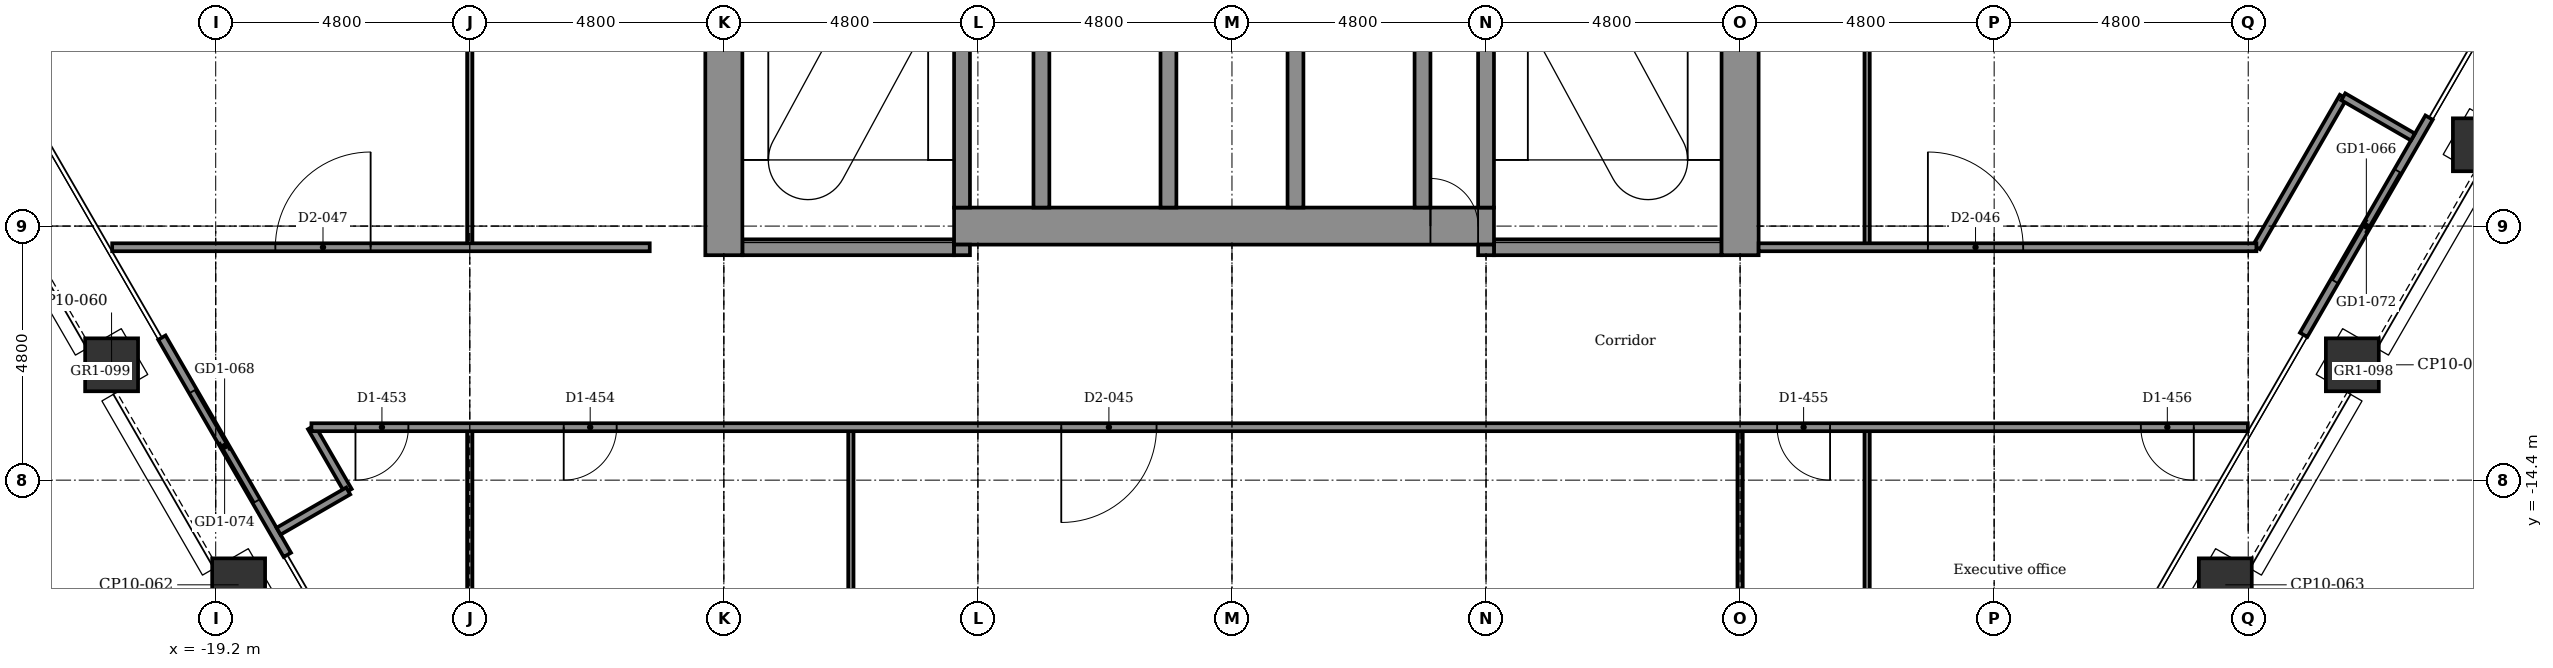
"""IFC4 building model, lengths in metres.
Left out: names, types, materials, properties, quantities, classifications, styles, units other than length and angle.
Written with IfcOpenShell. Run it as: python <this file> out.ifc"""

import sys

from ifc_helpers import new_model, si_unit, direction, frame, frame_2d, origin, origin_2d, place, context, subcontext, project, spatial, rectangle, extrude, element, fill, save


model = new_model("IFC4")
c1 = context("Model", 3, precision=1e-05, world=origin(), true_north=direction((0.0, 1.0)))
c2 = subcontext(c1, "Body", "Model", "MODEL_VIEW")
j1 = project(units=[si_unit("LENGTHUNIT", "METRE"), si_unit("PLANEANGLEUNIT", "RADIAN")], contexts=[c1])
p1 = place(None, origin())
s1 = spatial("IfcSite", under=j1, at=p1, CompositionType="ELEMENT")
p2 = place(p1, origin())
s2 = spatial("IfcBuilding", under=s1, at=p2, CompositionType="ELEMENT")
p3 = place(p2, frame((0.0, 0.0, 154.4)))
s3 = spatial("IfcBuildingStorey", under=s2, at=p3, CompositionType="ELEMENT", Elevation=154.4)
for number, where, z_axis, x_axis in (
    (1, (23.567, -8.064, -0.15), (0.0, 0.0, 1.0), (0.5, 0.866, 0.0)),
    (2, (21.167, -12.221, -0.15), (0.0, 0.0, 1.0), (0.5, 0.866, 0.0)),
    (3, (18.767, -16.378, -0.15), (0.0, 0.0, 1.0), (0.5, 0.866, 0.0)),
    (4, (-18.767, -16.378, -0.15), (0.0, 0.0, 1.0), (0.866, 0.5, 0.0)),
    (5, (-21.167, -12.221, -0.15), (0.0, 0.0, 1.0), (0.866, 0.5, 0.0)),
):
    element("IfcColumn", number, at=place(p3, frame(where, z_axis=z_axis, x_axis=x_axis)), inside=s3, PredefinedType="COLUMN", context=c2, shape_type="SweptSolid", body=[
        extrude(rectangle(XDim=1.0, YDim=1.0, at=origin_2d()), origin(), (0.0, 0.0, 1.0), 3.9),
    ])
p4 = place(p3, frame((-9.25, -10.0, -0.15), z_axis=(0.0, 0.0, 1.0), x_axis=(1.0, 0.0, 0.0)))
e6 = element("IfcWall", 6, at=p4, inside=s3, PredefinedType="STANDARD", context=c2, shape_type="SweptSolid", body=[
    extrude(rectangle(XDim=4.0, YDim=0.3, at=frame_2d((2.0, 0.0))), origin(), (0.0, 0.0, 1.0), 3.9),
])
p5 = place(p3, frame((4.95, -10.0, -0.15), z_axis=(0.0, 0.0, 1.0), x_axis=(1.0, 0.0, 0.0)))
e7 = element("IfcWall", 7, at=p5, inside=s3, PredefinedType="STANDARD", context=c2, shape_type="SweptSolid", body=[
    extrude(rectangle(XDim=4.3, YDim=0.3, at=frame_2d((2.15, 0.0))), origin(), (0.0, 0.0, 1.0), 3.9),
])
p6 = place(p3, frame((-5.25, -9.6, -0.15), z_axis=(0.0, 0.0, 1.0), x_axis=(1.0, 0.0, 0.0)))
e8 = element("IfcWall", 8, at=p6, inside=s3, PredefinedType="SHEAR", context=c2, shape_type="SweptSolid", body=[
    extrude(rectangle(XDim=10.2, YDim=0.7, at=frame_2d((5.1, 0.0))), origin(), (0.0, 0.0, 1.0), 3.9),
])
p7 = place(p6, frame((9.0, 0.0, 0.15)))
e9 = element("IfcOpeningElement", 9, at=p7, cuts=e8, PredefinedType="OPENING", context=c2, shape_type="SweptSolid", body=[
    extrude(rectangle(XDim=0.9, YDim=2.1, at=frame_2d((0.45, 1.05))), frame((0.0, 0.36, 0.0), z_axis=(0.0, -1.0, 0.0), x_axis=(1.0, 0.0, 0.0)), (0.0, 0.0, 1.0), 0.72),
])
p8 = place(p3, frame((-9.6, -10.15, -0.15), z_axis=(0.0, 0.0, 1.0), x_axis=(0.0, 1.0, 0.0)))
e10 = element("IfcWall", 10, at=p8, inside=s3, PredefinedType="SHEAR", context=c2, shape_type="SweptSolid", body=[
    extrude(rectangle(XDim=7.6, YDim=0.7, at=frame_2d((3.8, 0.0))), origin(), (0.0, 0.0, 1.0), 3.9),
])
p9 = place(p3, frame((-5.1, -10.15, -0.15), z_axis=(0.0, 0.0, 1.0), x_axis=(0.0, 1.0, 0.0)))
e11 = element("IfcWall", 11, at=p9, inside=s3, PredefinedType="STANDARD", context=c2, shape_type="SweptSolid", body=[
    extrude(rectangle(XDim=0.2, YDim=0.3, at=frame_2d((0.1, 0.0))), origin(), (0.0, 0.0, 1.0), 3.9),
])
p10 = place(p3, frame((-5.1, -9.25, -0.15), z_axis=(0.0, 0.0, 1.0), x_axis=(0.0, 1.0, 0.0)))
e12 = element("IfcWall", 12, at=p10, inside=s3, PredefinedType="STANDARD", context=c2, shape_type="SweptSolid", body=[
    extrude(rectangle(XDim=7.0, YDim=0.3, at=frame_2d((3.5, 0.0))), origin(), (0.0, 0.0, 1.0), 3.9),
])
p11 = place(p10, frame((3.8, 0.0, 0.15)))
e13 = element("IfcOpeningElement", 13, at=p11, cuts=e12, PredefinedType="OPENING", context=c2, shape_type="SweptSolid", body=[
    extrude(rectangle(XDim=1.2, YDim=2.1, at=frame_2d((0.6, 1.05))), frame((0.0, 0.16, 0.0), z_axis=(0.0, -1.0, 0.0), x_axis=(1.0, 0.0, 0.0)), (0.0, 0.0, 1.0), 0.32),
])
for number, where, z_axis, x_axis in (
    (14, (-3.6, -9.25, -0.15), (0.0, 0.0, 1.0), (0.0, 1.0, 0.0)),
    (15, (-1.2, -9.25, -0.15), (0.0, 0.0, 1.0), (0.0, 1.0, 0.0)),
    (16, (1.2, -9.25, -0.15), (0.0, 0.0, 1.0), (0.0, 1.0, 0.0)),
    (17, (3.6, -9.25, -0.15), (0.0, 0.0, 1.0), (0.0, 1.0, 0.0)),
):
    element("IfcWall", number, at=place(p3, frame(where, z_axis=z_axis, x_axis=x_axis)), inside=s3, PredefinedType="STANDARD", context=c2, shape_type="SweptSolid", body=[
        extrude(rectangle(XDim=3.4, YDim=0.3, at=frame_2d((1.7, 0.0))), origin(), (0.0, 0.0, 1.0), 3.9),
    ])
p12 = place(p3, frame((4.8, -10.15, -0.15), z_axis=(0.0, 0.0, 1.0), x_axis=(0.0, 1.0, 0.0)))
e18 = element("IfcWall", 18, at=p12, inside=s3, PredefinedType="STANDARD", context=c2, shape_type="SweptSolid", body=[
    extrude(rectangle(XDim=0.2, YDim=0.3, at=frame_2d((0.1, 0.0))), origin(), (0.0, 0.0, 1.0), 3.9),
])
p13 = place(p3, frame((4.8, -9.25, -0.15), z_axis=(0.0, 0.0, 1.0), x_axis=(0.0, 1.0, 0.0)))
e19 = element("IfcWall", 19, at=p13, inside=s3, PredefinedType="STANDARD", context=c2, shape_type="SweptSolid", body=[
    extrude(rectangle(XDim=7.0, YDim=0.3, at=frame_2d((3.5, 0.0))), origin(), (0.0, 0.0, 1.0), 3.9),
])
p14 = place(p13, frame((3.8, 0.0, 0.15)))
e20 = element("IfcOpeningElement", 20, at=p14, cuts=e19, PredefinedType="OPENING", context=c2, shape_type="SweptSolid", body=[
    extrude(rectangle(XDim=1.2, YDim=2.1, at=frame_2d((0.6, 1.05))), frame((0.0, 0.16, 0.0), z_axis=(0.0, -1.0, 0.0), x_axis=(1.0, 0.0, 0.0)), (0.0, 0.0, 1.0), 0.32),
])
p15 = place(p3, frame((9.6, -10.15, -0.15), z_axis=(0.0, 0.0, 1.0), x_axis=(0.0, 1.0, 0.0)))
e21 = element("IfcWall", 21, at=p15, inside=s3, PredefinedType="SHEAR", context=c2, shape_type="SweptSolid", body=[
    extrude(rectangle(XDim=20.1, YDim=0.7, at=frame_2d((10.05, 0.0))), origin(), (0.0, 0.0, 1.0), 3.9),
])
p16 = place(p3, frame((22.617, -7.55, 0.0), z_axis=(0.0, 0.0, 1.0), x_axis=(-0.5000167099, -0.866015756104, 0.0)))
e22 = element("IfcWall", 22, at=p16, inside=s3, PredefinedType="PARTITIONING", context=c2, shape_type="SweptSolid", body=[
    extrude(rectangle(XDim=4.74, YDim=0.16, at=frame_2d((2.37, 0.0))), origin(), (0.0, 0.0, 1.0), 3.75),
])
p17 = place(p16, frame((1.17, 0.0, 0.0)))
e23 = element("IfcOpeningElement", 23, at=p17, cuts=e22, PredefinedType="OPENING", context=c2, shape_type="SweptSolid", body=[
    extrude(rectangle(XDim=2.4, YDim=2.4, at=frame_2d((1.2, 1.2))), frame((0.0, 0.09, 0.0), z_axis=(0.0, -1.0, 0.0), x_axis=(1.0, 0.0, 0.0)), (0.0, 0.0, 1.0), 0.18),
])
p18 = place(p3, frame((-17.847, -15.812, 0.0), z_axis=(0.0, 0.0, 1.0), x_axis=(-0.5000167099, 0.866015756104, 0.0)))
e24 = element("IfcWall", 24, at=p18, inside=s3, PredefinedType="PARTITIONING", context=c2, shape_type="SweptSolid", body=[
    extrude(rectangle(XDim=4.74, YDim=0.16, at=frame_2d((2.37, 0.0))), origin(), (0.0, 0.0, 1.0), 3.75),
])
p19 = place(p18, frame((1.17, 0.0, 0.0)))
e25 = element("IfcOpeningElement", 25, at=p19, cuts=e24, PredefinedType="OPENING", context=c2, shape_type="SweptSolid", body=[
    extrude(rectangle(XDim=2.4, YDim=2.4, at=frame_2d((1.2, 1.2))), frame((0.0, 0.09, 0.0), z_axis=(0.0, -1.0, 0.0), x_axis=(1.0, 0.0, 0.0)), (0.0, 0.0, 1.0), 0.18),
])
p20 = place(p3, frame((12.0, -23.271, 0.0), z_axis=(0.0, 0.0, 1.0), x_axis=(0.0, 1.0, 0.0)))
e26 = element("IfcWall", 26, at=p20, inside=s3, PredefinedType="PARTITIONING", context=c2, shape_type="SweptSolid", body=[
    extrude(rectangle(XDim=9.872, YDim=0.1, at=frame_2d((4.936, 0.0))), origin(), (0.0, 0.0, 1.0), 3.75),
])
p21 = place(p3, frame((12.0, -10.0, 0.0), z_axis=(0.0, 0.0, 1.0), x_axis=(0.0, 1.0, 0.0)))
e27 = element("IfcWall", 27, at=p21, inside=s3, PredefinedType="PARTITIONING", context=c2, shape_type="SweptSolid", body=[
    extrude(rectangle(XDim=24.042, YDim=0.1, at=frame_2d((12.021, 0.0))), origin(), (0.0, 0.0, 1.0), 3.75),
])
p22 = place(p3, frame((9.6, -23.271, 0.0), z_axis=(0.0, 0.0, 1.0), x_axis=(0.0, 1.0, 0.0)))
e28 = element("IfcWall", 28, at=p22, inside=s3, PredefinedType="PARTITIONING", context=c2, shape_type="SweptSolid", body=[
    extrude(rectangle(XDim=9.872, YDim=0.1, at=frame_2d((4.936, 0.0))), origin(), (0.0, 0.0, 1.0), 3.066),
])
p23 = place(p3, frame((-7.2, -23.271, 0.0), z_axis=(0.0, 0.0, 1.0), x_axis=(0.0, 1.0, 0.0)))
e29 = element("IfcWall", 29, at=p23, inside=s3, PredefinedType="PARTITIONING", context=c2, shape_type="SweptSolid", body=[
    extrude(rectangle(XDim=9.872, YDim=0.1, at=frame_2d((4.936, 0.0))), origin(), (0.0, 0.0, 1.0), 3.75),
])
p24 = place(p3, frame((-14.4, -21.701, 0.0), z_axis=(0.0, 0.0, 1.0), x_axis=(0.0, 1.0, 0.0)))
e30 = element("IfcWall", 30, at=p24, inside=s3, PredefinedType="PARTITIONING", context=c2, shape_type="SweptSolid", body=[
    extrude(rectangle(XDim=8.302, YDim=0.1, at=frame_2d((4.151, 0.0))), origin(), (0.0, 0.0, 1.0), 3.066),
])
p25 = place(p3, frame((-14.4, -10.0, 0.0), z_axis=(0.0, 0.0, 1.0), x_axis=(0.0, 1.0, 0.0)))
e31 = element("IfcWall", 31, at=p25, inside=s3, PredefinedType="PARTITIONING", context=c2, shape_type="SweptSolid", body=[
    extrude(rectangle(XDim=19.694, YDim=0.1, at=frame_2d((9.847, 0.0))), origin(), (0.0, 0.0, 1.0), 3.75),
])
p26 = place(p3, frame((-17.392, -13.4, 0.0), z_axis=(0.0, 0.0, 1.0), x_axis=(0.4999705729, -0.866042392862, 0.0)))
e32 = element("IfcWall", 32, at=p26, inside=s3, PredefinedType="PARTITIONING", context=c2, shape_type="SweptSolid", body=[
    extrude(rectangle(XDim=1.391, YDim=0.15, at=frame_2d((0.696, 0.0))), origin(), (0.0, 0.0, 1.0), 3.75),
])
p27 = place(p3, frame((19.354, -10.0, 0.0), z_axis=(0.0, 0.0, 1.0), x_axis=(0.500009969958, 0.86601964755, 0.0)))
e33 = element("IfcWall", 33, at=p27, inside=s3, PredefinedType="PARTITIONING", context=c2, shape_type="SweptSolid", body=[
    extrude(rectangle(XDim=3.283, YDim=0.15, at=frame_2d((1.642, 0.0))), origin(), (0.0, 0.0, 1.0), 3.75),
])
p28 = place(p3, frame((20.996, -7.157, 0.0), z_axis=(0.0, 0.0, 1.0), x_axis=(0.865960906633, -0.500111695708, 0.0)))
e34 = element("IfcWall", 34, at=p28, inside=s3, PredefinedType="PARTITIONING", context=c2, shape_type="SweptSolid", body=[
    extrude(rectangle(XDim=1.52, YDim=0.15, at=frame_2d((0.76, 0.0))), origin(), (0.0, 0.0, 1.0), 3.75),
])
p29 = place(p3, frame((-18.012, -15.365, 0.0), z_axis=(0.0, 0.0, 1.0), x_axis=(0.866030456496, 0.499991248344, 0.0)))
e35 = element("IfcWall", 35, at=p29, inside=s3, PredefinedType="PARTITIONING", context=c2, shape_type="SweptSolid", body=[
    extrude(rectangle(XDim=1.52, YDim=0.15, at=frame_2d((0.76, 0.0))), origin(), (0.0, 0.0, 1.0), 3.75),
])
p30 = place(p3, frame((-17.392, -13.4, 0.0), z_axis=(0.0, 0.0, 1.0), x_axis=(1.0, 0.0, 0.0)))
e36 = element("IfcWall", 36, at=p30, inside=s3, PredefinedType="PARTITIONING", context=c2, shape_type="SweptSolid", body=[
    extrude(rectangle(XDim=36.584, YDim=0.15, at=frame_2d((18.292, 0.0))), origin(), (0.0, 0.0, 1.0), 3.75),
])
p31 = place(p30, frame((0.832, 0.0, 0.0)))
e37 = element("IfcOpeningElement", 37, at=p31, cuts=e36, PredefinedType="OPENING", context=c2, shape_type="SweptSolid", body=[
    extrude(rectangle(XDim=1.0, YDim=2.1, at=frame_2d((0.5, 1.05))), frame((0.0, 0.085, 0.0), z_axis=(0.0, -1.0, 0.0), x_axis=(1.0, 0.0, 0.0)), (0.0, 0.0, 1.0), 0.17),
])
p32 = place(p30, frame((4.767, 0.0, 0.0)))
e38 = element("IfcOpeningElement", 38, at=p32, cuts=e36, PredefinedType="OPENING", context=c2, shape_type="SweptSolid", body=[
    extrude(rectangle(XDim=1.0, YDim=2.1, at=frame_2d((0.5, 1.05))), frame((0.0, 0.085, 0.0), z_axis=(0.0, -1.0, 0.0), x_axis=(1.0, 0.0, 0.0)), (0.0, 0.0, 1.0), 0.17),
])
p33 = place(p30, frame((14.167, 0.0, 0.0)))
e39 = element("IfcOpeningElement", 39, at=p33, cuts=e36, PredefinedType="OPENING", context=c2, shape_type="SweptSolid", body=[
    extrude(rectangle(XDim=1.8, YDim=2.1, at=frame_2d((0.9, 1.05))), frame((0.0, 0.085, 0.0), z_axis=(0.0, -1.0, 0.0), x_axis=(1.0, 0.0, 0.0)), (0.0, 0.0, 1.0), 0.17),
])
p34 = place(p30, frame((27.692, 0.0, 0.0)))
e40 = element("IfcOpeningElement", 40, at=p34, cuts=e36, PredefinedType="OPENING", context=c2, shape_type="SweptSolid", body=[
    extrude(rectangle(XDim=1.0, YDim=2.1, at=frame_2d((0.5, 1.05))), frame((0.0, 0.085, 0.0), z_axis=(0.0, -1.0, 0.0), x_axis=(1.0, 0.0, 0.0)), (0.0, 0.0, 1.0), 0.17),
])
p35 = place(p30, frame((34.563, 0.0, 0.0)))
e41 = element("IfcOpeningElement", 41, at=p35, cuts=e36, PredefinedType="OPENING", context=c2, shape_type="SweptSolid", body=[
    extrude(rectangle(XDim=1.0, YDim=2.1, at=frame_2d((0.5, 1.05))), frame((0.0, 0.085, 0.0), z_axis=(0.0, -1.0, 0.0), x_axis=(1.0, 0.0, 0.0)), (0.0, 0.0, 1.0), 0.17),
])
p36 = place(p3, frame((-21.156, -10.0, 0.0), z_axis=(0.0, 0.0, 1.0), x_axis=(1.0, 0.0, 0.0)))
e42 = element("IfcWall", 42, at=p36, inside=s3, PredefinedType="PARTITIONING", context=c2, shape_type="SweptSolid", body=[
    extrude(rectangle(XDim=10.156, YDim=0.15, at=frame_2d((5.078, 0.0))), origin(), (0.0, 0.0, 1.0), 3.75),
])
p37 = place(p36, frame((3.083, 0.0, 0.0)))
e43 = element("IfcOpeningElement", 43, at=p37, cuts=e42, PredefinedType="OPENING", context=c2, shape_type="SweptSolid", body=[
    extrude(rectangle(XDim=1.8, YDim=2.1, at=frame_2d((0.9, 1.05))), frame((0.0, 0.085, 0.0), z_axis=(0.0, -1.0, 0.0), x_axis=(1.0, 0.0, 0.0)), (0.0, 0.0, 1.0), 0.17),
])
p38 = place(p3, frame((9.95, -10.0, 0.0), z_axis=(0.0, 0.0, 1.0), x_axis=(1.0, 0.0, 0.0)))
e44 = element("IfcWall", 44, at=p38, inside=s3, PredefinedType="PARTITIONING", context=c2, shape_type="SweptSolid", body=[
    extrude(rectangle(XDim=9.405, YDim=0.15, at=frame_2d((4.702, 0.0))), origin(), (0.0, 0.0, 1.0), 3.75),
])
p39 = place(p38, frame((3.198, 0.0, 0.0)))
e45 = element("IfcOpeningElement", 45, at=p39, cuts=e44, PredefinedType="OPENING", context=c2, shape_type="SweptSolid", body=[
    extrude(rectangle(XDim=1.8, YDim=2.1, at=frame_2d((0.9, 1.05))), frame((0.0, 0.085, 0.0), z_axis=(0.0, -1.0, 0.0), x_axis=(1.0, 0.0, 0.0)), (0.0, 0.0, 1.0), 0.17),
])
p40 = place(p17, origin())
e46 = element("IfcDoor", 46, at=p40, inside=s3, OperationType="DOUBLE_DOOR_SLIDING", PredefinedType="DOOR", context=c2, shape_type="SweptSolid", body=[
    extrude(rectangle(XDim=2.4, YDim=2.4, at=frame_2d((1.2, 1.2))), frame((0.0, 0.025, 0.0), z_axis=(0.0, -1.0, 0.0), x_axis=(1.0, 0.0, 0.0)), (0.0, 0.0, 1.0), 0.05),
])
fill(e23, e46)
p41 = place(p19, origin())
e47 = element("IfcDoor", 47, at=p41, inside=s3, OperationType="DOUBLE_DOOR_SLIDING", PredefinedType="DOOR", context=c2, shape_type="SweptSolid", body=[
    extrude(rectangle(XDim=2.4, YDim=2.4, at=frame_2d((1.2, 1.2))), frame((0.0, 0.025, 0.0), z_axis=(0.0, -1.0, 0.0), x_axis=(1.0, 0.0, 0.0)), (0.0, 0.0, 1.0), 0.05),
])
fill(e25, e47)
p42 = place(p31, frame((1.0, 0.0, 0.0), z_axis=(0.0, 0.0, 1.0), x_axis=(-1.0, 0.0, 0.0)))
e48 = element("IfcDoor", 48, at=p42, inside=s3, OperationType="SINGLE_SWING_LEFT", PredefinedType="DOOR", context=c2, shape_type="SweptSolid", body=[
    extrude(rectangle(XDim=1.0, YDim=2.1, at=frame_2d((0.5, 1.05))), frame((0.0, 0.025, 0.0), z_axis=(0.0, -1.0, 0.0), x_axis=(1.0, 0.0, 0.0)), (0.0, 0.0, 1.0), 0.05),
])
fill(e37, e48)
p43 = place(p32, frame((1.0, 0.0, 0.0), z_axis=(0.0, 0.0, 1.0), x_axis=(-1.0, 0.0, 0.0)))
e49 = element("IfcDoor", 49, at=p43, inside=s3, OperationType="SINGLE_SWING_LEFT", PredefinedType="DOOR", context=c2, shape_type="SweptSolid", body=[
    extrude(rectangle(XDim=1.0, YDim=2.1, at=frame_2d((0.5, 1.05))), frame((0.0, 0.025, 0.0), z_axis=(0.0, -1.0, 0.0), x_axis=(1.0, 0.0, 0.0)), (0.0, 0.0, 1.0), 0.05),
])
fill(e38, e49)
p44 = place(p33, frame((1.8, 0.0, 0.0), z_axis=(0.0, 0.0, 1.0), x_axis=(-1.0, 0.0, 0.0)))
e50 = element("IfcDoor", 50, at=p44, inside=s3, OperationType="SINGLE_SWING_LEFT", PredefinedType="DOOR", context=c2, shape_type="SweptSolid", body=[
    extrude(rectangle(XDim=1.8, YDim=2.1, at=frame_2d((0.9, 1.05))), frame((0.0, 0.025, 0.0), z_axis=(0.0, -1.0, 0.0), x_axis=(1.0, 0.0, 0.0)), (0.0, 0.0, 1.0), 0.05),
])
fill(e39, e50)
p45 = place(p34, frame((1.0, 0.0, 0.0), z_axis=(0.0, 0.0, 1.0), x_axis=(-1.0, 0.0, 0.0)))
e51 = element("IfcDoor", 51, at=p45, inside=s3, OperationType="SINGLE_SWING_RIGHT", PredefinedType="DOOR", context=c2, shape_type="SweptSolid", body=[
    extrude(rectangle(XDim=1.0, YDim=2.1, at=frame_2d((0.5, 1.05))), frame((0.0, 0.025, 0.0), z_axis=(0.0, -1.0, 0.0), x_axis=(1.0, 0.0, 0.0)), (0.0, 0.0, 1.0), 0.05),
])
fill(e40, e51)
p46 = place(p35, frame((1.0, 0.0, 0.0), z_axis=(0.0, 0.0, 1.0), x_axis=(-1.0, 0.0, 0.0)))
e52 = element("IfcDoor", 52, at=p46, inside=s3, OperationType="SINGLE_SWING_RIGHT", PredefinedType="DOOR", context=c2, shape_type="SweptSolid", body=[
    extrude(rectangle(XDim=1.0, YDim=2.1, at=frame_2d((0.5, 1.05))), frame((0.0, 0.025, 0.0), z_axis=(0.0, -1.0, 0.0), x_axis=(1.0, 0.0, 0.0)), (0.0, 0.0, 1.0), 0.05),
])
fill(e41, e52)
p47 = place(p39, origin())
e53 = element("IfcDoor", 53, at=p47, inside=s3, OperationType="SINGLE_SWING_LEFT", PredefinedType="DOOR", context=c2, shape_type="SweptSolid", body=[
    extrude(rectangle(XDim=1.8, YDim=2.1, at=frame_2d((0.9, 1.05))), frame((0.0, 0.025, 0.0), z_axis=(0.0, -1.0, 0.0), x_axis=(1.0, 0.0, 0.0)), (0.0, 0.0, 1.0), 0.05),
])
fill(e45, e53)
p48 = place(p37, origin())
e54 = element("IfcDoor", 54, at=p48, inside=s3, OperationType="SINGLE_SWING_RIGHT", PredefinedType="DOOR", context=c2, shape_type="SweptSolid", body=[
    extrude(rectangle(XDim=1.8, YDim=2.1, at=frame_2d((0.9, 1.05))), frame((0.0, 0.025, 0.0), z_axis=(0.0, -1.0, 0.0), x_axis=(1.0, 0.0, 0.0)), (0.0, 0.0, 1.0), 0.05),
])
fill(e43, e54)
p49 = place(p7, origin())
e55 = element("IfcDoor", 55, at=p49, inside=s3, OperationType="SINGLE_SWING_LEFT", PredefinedType="DOOR", context=c2, shape_type="SweptSolid", body=[
    extrude(rectangle(XDim=0.9, YDim=2.1, at=frame_2d((0.45, 1.05))), frame((0.0, 0.025, 0.0), z_axis=(0.0, -1.0, 0.0), x_axis=(1.0, 0.0, 0.0)), (0.0, 0.0, 1.0), 0.05),
])
fill(e9, e55)
save(model, sys.argv[1])
